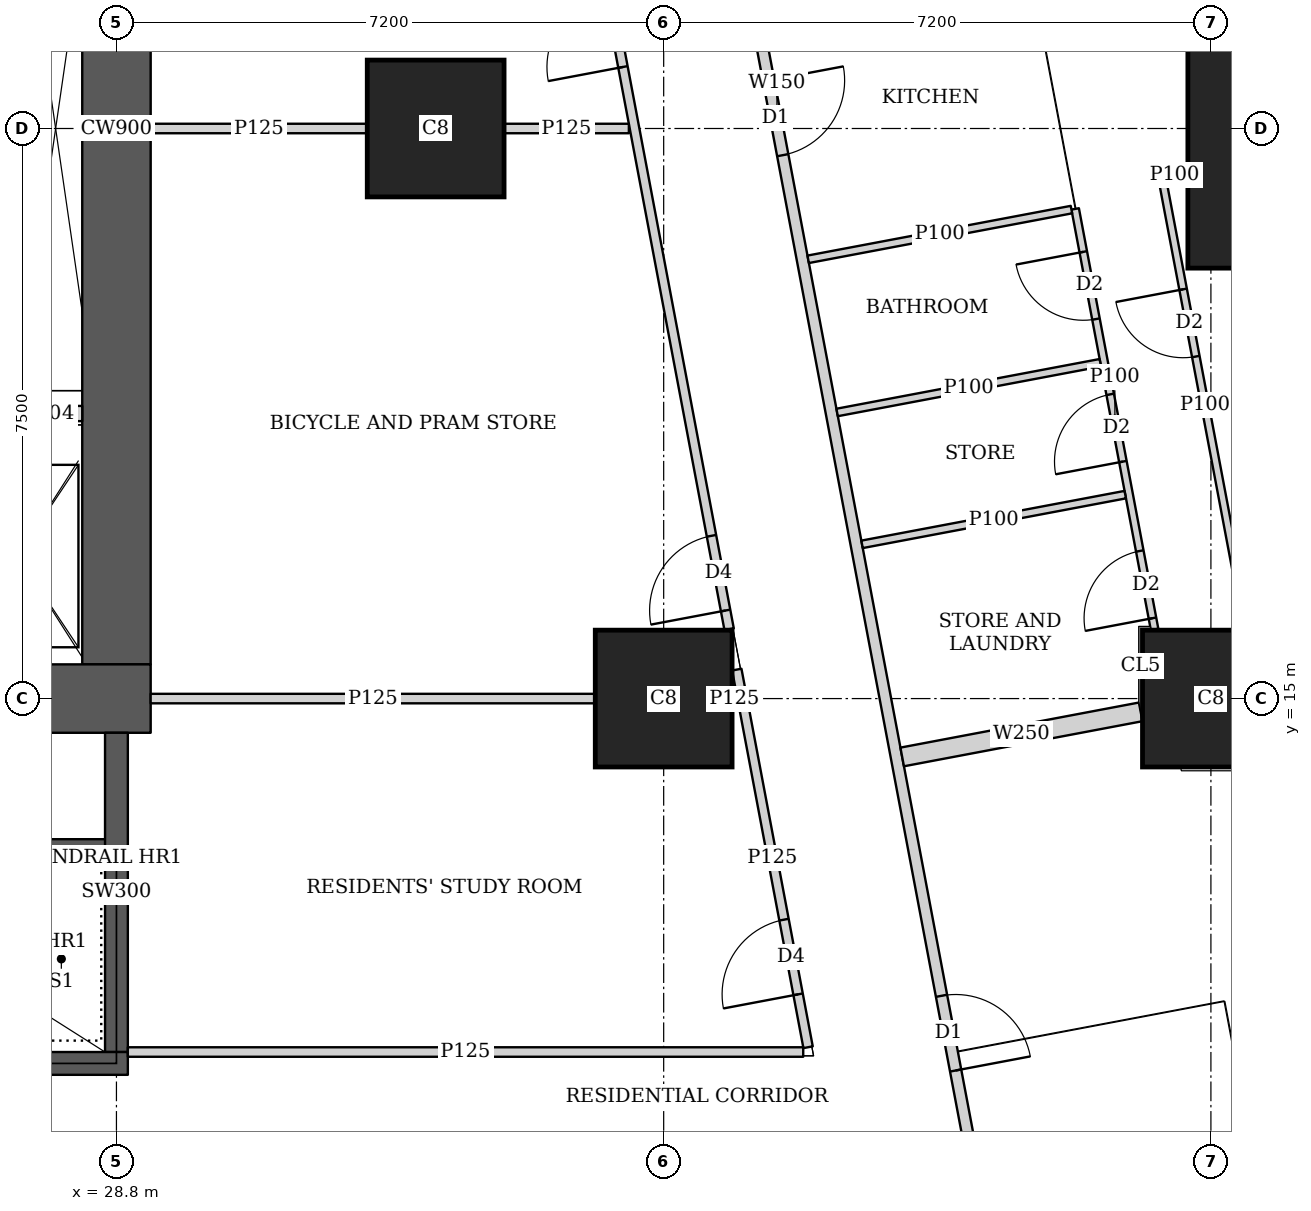
"""IFC4 building model, lengths in metres.
Left out: names, types, materials, properties, quantities, classifications, styles, units other than length and angle.
Written with IfcOpenShell. Run it as: python <this file> out.ifc"""

import sys

from ifc_helpers import new_model, si_unit, direction, frame, frame_2d, origin, origin_2d, place, context, subcontext, project, spatial, rectangle, extrude, element, fill, save


model = new_model("IFC4")
c1 = context("Model", 3, precision=1e-05, world=origin(), true_north=direction((0.0, 1.0)))
c2 = subcontext(c1, "Body", "Model", "MODEL_VIEW")
j1 = project(units=[si_unit("LENGTHUNIT", "METRE"), si_unit("PLANEANGLEUNIT", "RADIAN")], contexts=[c1])
p1 = place(None, origin())
s1 = spatial("IfcSite", under=j1, at=p1, CompositionType="ELEMENT")
p2 = place(p1, origin())
s2 = spatial("IfcBuilding", under=s1, at=p2, CompositionType="ELEMENT")
p3 = place(p2, frame((0.0, 0.0, 42.5)))
s3 = spatial("IfcBuildingStorey", under=s2, at=p3, CompositionType="ELEMENT", Elevation=42.5)
for number, where, z_axis, x_axis in (
    (1, (36.0, 15.0, 0.0), (0.0, 0.0, 1.0), (1.0, 0.0, 0.0)),
    (2, (43.2, 15.0, 0.0), (0.0, 0.0, 1.0), (1.0, 0.0, 0.0)),
    (3, (33.0, 22.5, 0.0), (0.0, 0.0, 1.0), (1.0, 0.0, 0.0)),
):
    element("IfcColumn", number, at=place(p3, frame(where, z_axis=z_axis, x_axis=x_axis)), inside=s3, PredefinedType="COLUMN", context=c2, shape_type="SweptSolid", body=[
        extrude(rectangle(XDim=1.8, YDim=1.8, at=origin_2d()), origin(), (0.0, 0.0, 1.0), 3.75),
    ])
p4 = place(p3, frame((44.697, 22.263, 0.0), z_axis=(0.0, 0.0, 1.0), x_axis=(1.0, 0.0, 0.0)))
e4 = element("IfcColumn", 4, at=p4, inside=s3, PredefinedType="COLUMN", context=c2, shape_type="SweptSolid", body=[
    extrude(rectangle(XDim=3.6, YDim=3.2, at=origin_2d()), origin(), (0.0, 0.0, 1.0), 3.75),
])
p5 = place(p3, frame((13.95, 15.0, 0.0), z_axis=(0.0, 0.0, 1.0), x_axis=(1.0, 0.0, 0.0)))
e5 = element("IfcWall", 5, at=p5, inside=s3, PredefinedType="SHEAR", context=c2, shape_type="SweptSolid", body=[
    extrude(rectangle(XDim=15.3, YDim=0.9, at=frame_2d((7.65, 0.0))), origin(), (0.0, 0.0, 1.0), 3.75),
])
p6 = place(p5, frame((4.45, 0.0, 0.0)))
e6 = element("IfcOpeningElement", 6, at=p6, cuts=e5, PredefinedType="OPENING", context=c2, shape_type="SweptSolid", body=[
    extrude(rectangle(XDim=1.8, YDim=2.1, at=frame_2d((0.9, 1.05))), frame((0.0, 0.46, 0.0), z_axis=(0.0, -1.0, 0.0), x_axis=(1.0, 0.0, 0.0)), (0.0, 0.0, 1.0), 0.92),
])
p7 = place(p5, frame((10.7, 0.0, 0.0)))
e7 = element("IfcOpeningElement", 7, at=p7, cuts=e5, PredefinedType="OPENING", context=c2, shape_type="SweptSolid", body=[
    extrude(rectangle(XDim=1.1, YDim=2.1, at=frame_2d((0.55, 1.05))), frame((0.0, 0.46, 0.0), z_axis=(0.0, -1.0, 0.0), x_axis=(1.0, 0.0, 0.0)), (0.0, 0.0, 1.0), 0.92),
])
p8 = place(p3, frame((28.8, 15.45, 0.0), z_axis=(0.0, 0.0, 1.0), x_axis=(0.0, 1.0, 0.0)))
e8 = element("IfcWall", 8, at=p8, inside=s3, PredefinedType="SHEAR", context=c2, shape_type="SweptSolid", body=[
    extrude(rectangle(XDim=14.1, YDim=0.9, at=frame_2d((7.05, 0.0))), origin(), (0.0, 0.0, 1.0), 3.75),
])
p9 = place(p3, frame((21.45, 10.2, 0.0), z_axis=(0.0, 0.0, 1.0), x_axis=(1.0, 0.0, 0.0)))
e9 = element("IfcWall", 9, at=p9, inside=s3, PredefinedType="SHEAR", context=c2, shape_type="SweptSolid", body=[
    extrude(rectangle(XDim=7.5, YDim=0.3, at=frame_2d((3.75, 0.0))), origin(), (0.0, 0.0, 1.0), 3.75),
])
p10 = place(p9, frame((0.5, 0.0, 0.0)))
e10 = element("IfcOpeningElement", 10, at=p10, cuts=e9, PredefinedType="OPENING", context=c2, shape_type="SweptSolid", body=[
    extrude(rectangle(XDim=1.1, YDim=2.1, at=frame_2d((0.55, 1.05))), frame((0.0, 0.16, 0.0), z_axis=(0.0, -1.0, 0.0), x_axis=(1.0, 0.0, 0.0)), (0.0, 0.0, 1.0), 0.32),
])
p11 = place(p3, frame((28.8, 10.35, 0.0), z_axis=(0.0, 0.0, 1.0), x_axis=(0.0, 1.0, 0.0)))
e11 = element("IfcWall", 11, at=p11, inside=s3, PredefinedType="SHEAR", context=c2, shape_type="SweptSolid", body=[
    extrude(rectangle(XDim=4.2, YDim=0.3, at=frame_2d((2.1, 0.0))), origin(), (0.0, 0.0, 1.0), 3.75),
])
p12 = place(p3, frame((50.653, 2.703, 0.0), z_axis=(0.0, 0.0, 1.0), x_axis=(-0.185612026696, 0.982623109613, 0.0)))
e12 = element("IfcWall", 12, at=p12, inside=s3, PredefinedType="SOLIDWALL", context=c2, shape_type="SweptSolid", body=[
    extrude(rectangle(XDim=41.393, YDim=0.2, at=frame_2d((20.697, 0.0))), origin(), (0.0, 0.0, 1.0), 3.5),
])
p13 = place(p12, frame((1.633, 0.0, 0.9)))
e13 = element("IfcOpeningElement", 13, at=p13, cuts=e12, PredefinedType="OPENING", context=c2, shape_type="SweptSolid", body=[
    extrude(rectangle(XDim=1.8, YDim=1.5, at=frame_2d((0.9, 0.75))), frame((0.0, 0.11, 0.0), z_axis=(0.0, -1.0, 0.0), x_axis=(1.0, 0.0, 0.0)), (0.0, 0.0, 1.0), 0.22),
])
p14 = place(p12, frame((6.032, 0.0, 0.9)))
e14 = element("IfcOpeningElement", 14, at=p14, cuts=e12, PredefinedType="OPENING", context=c2, shape_type="SweptSolid", body=[
    extrude(rectangle(XDim=1.8, YDim=1.5, at=frame_2d((0.9, 0.75))), frame((0.0, 0.11, 0.0), z_axis=(0.0, -1.0, 0.0), x_axis=(1.0, 0.0, 0.0)), (0.0, 0.0, 1.0), 0.22),
])
p15 = place(p12, frame((9.848, 0.0, 0.9)))
e15 = element("IfcOpeningElement", 15, at=p15, cuts=e12, PredefinedType="OPENING", context=c2, shape_type="SweptSolid", body=[
    extrude(rectangle(XDim=1.8, YDim=1.5, at=frame_2d((0.9, 0.75))), frame((0.0, 0.11, 0.0), z_axis=(0.0, -1.0, 0.0), x_axis=(1.0, 0.0, 0.0)), (0.0, 0.0, 1.0), 0.22),
])
p16 = place(p12, frame((17.481, 0.0, 0.9)))
e16 = element("IfcOpeningElement", 16, at=p16, cuts=e12, PredefinedType="OPENING", context=c2, shape_type="SweptSolid", body=[
    extrude(rectangle(XDim=1.8, YDim=1.5, at=frame_2d((0.9, 0.75))), frame((0.0, 0.11, 0.0), z_axis=(0.0, -1.0, 0.0), x_axis=(1.0, 0.0, 0.0)), (0.0, 0.0, 1.0), 0.22),
])
p17 = place(p12, frame((21.297, 0.0, 0.9)))
e17 = element("IfcOpeningElement", 17, at=p17, cuts=e12, PredefinedType="OPENING", context=c2, shape_type="SweptSolid", body=[
    extrude(rectangle(XDim=1.8, YDim=1.5, at=frame_2d((0.9, 0.75))), frame((0.0, 0.11, 0.0), z_axis=(0.0, -1.0, 0.0), x_axis=(1.0, 0.0, 0.0)), (0.0, 0.0, 1.0), 0.22),
])
p18 = place(p12, frame((25.113, 0.0, 0.9)))
e18 = element("IfcOpeningElement", 18, at=p18, cuts=e12, PredefinedType="OPENING", context=c2, shape_type="SweptSolid", body=[
    extrude(rectangle(XDim=1.8, YDim=1.5, at=frame_2d((0.9, 0.75))), frame((0.0, 0.11, 0.0), z_axis=(0.0, -1.0, 0.0), x_axis=(1.0, 0.0, 0.0)), (0.0, 0.0, 1.0), 0.22),
])
p19 = place(p12, frame((28.93, 0.0, 0.9)))
e19 = element("IfcOpeningElement", 19, at=p19, cuts=e12, PredefinedType="OPENING", context=c2, shape_type="SweptSolid", body=[
    extrude(rectangle(XDim=1.8, YDim=1.5, at=frame_2d((0.9, 0.75))), frame((0.0, 0.11, 0.0), z_axis=(0.0, -1.0, 0.0), x_axis=(1.0, 0.0, 0.0)), (0.0, 0.0, 1.0), 0.22),
])
p20 = place(p12, frame((32.746, 0.0, 0.9)))
e20 = element("IfcOpeningElement", 20, at=p20, cuts=e12, PredefinedType="OPENING", context=c2, shape_type="SweptSolid", body=[
    extrude(rectangle(XDim=1.8, YDim=1.5, at=frame_2d((0.9, 0.75))), frame((0.0, 0.11, 0.0), z_axis=(0.0, -1.0, 0.0), x_axis=(1.0, 0.0, 0.0)), (0.0, 0.0, 1.0), 0.22),
])
p21 = place(p12, frame((36.481, 0.0, 0.9)))
e21 = element("IfcOpeningElement", 21, at=p21, cuts=e12, PredefinedType="OPENING", context=c2, shape_type="SweptSolid", body=[
    extrude(rectangle(XDim=1.8, YDim=1.5, at=frame_2d((0.9, 0.75))), frame((0.0, 0.11, 0.0), z_axis=(0.0, -1.0, 0.0), x_axis=(1.0, 0.0, 0.0)), (0.0, 0.0, 1.0), 0.22),
])
p22 = place(p3, frame((33.68, 42.723, 0.0), z_axis=(0.0, 0.0, 1.0), x_axis=(0.185624129307, -0.98262082342, 0.0)))
e22 = element("IfcWall", 22, at=p22, inside=s3, PredefinedType="SOLIDWALL", context=c2, shape_type="SweptSolid", body=[
    extrude(rectangle(XDim=41.051, YDim=0.15, at=frame_2d((20.526, 0.0))), origin(), (0.0, 0.0, 1.0), 2.5),
])
p23 = place(p22, frame((7.73, 0.0, 0.0)))
e23 = element("IfcOpeningElement", 23, at=p23, cuts=e22, PredefinedType="OPENING", context=c2, shape_type="SweptSolid", body=[
    extrude(rectangle(XDim=1.0, YDim=2.1, at=frame_2d((0.5, 1.05))), frame((0.0, 0.085, 0.0), z_axis=(0.0, -1.0, 0.0), x_axis=(1.0, 0.0, 0.0)), (0.0, 0.0, 1.0), 0.17),
])
p24 = place(p22, frame((12.307, 0.0, 0.0)))
e24 = element("IfcOpeningElement", 24, at=p24, cuts=e22, PredefinedType="OPENING", context=c2, shape_type="SweptSolid", body=[
    extrude(rectangle(XDim=1.0, YDim=2.1, at=frame_2d((0.5, 1.05))), frame((0.0, 0.085, 0.0), z_axis=(0.0, -1.0, 0.0), x_axis=(1.0, 0.0, 0.0)), (0.0, 0.0, 1.0), 0.17),
])
p25 = place(p22, frame((19.938, 0.0, 0.0)))
e25 = element("IfcOpeningElement", 25, at=p25, cuts=e22, PredefinedType="OPENING", context=c2, shape_type="SweptSolid", body=[
    extrude(rectangle(XDim=1.0, YDim=2.1, at=frame_2d((0.5, 1.05))), frame((0.0, 0.085, 0.0), z_axis=(0.0, -1.0, 0.0), x_axis=(1.0, 0.0, 0.0)), (0.0, 0.0, 1.0), 0.17),
])
p26 = place(p22, frame((32.193, 0.0, 0.0)))
e26 = element("IfcOpeningElement", 26, at=p26, cuts=e22, PredefinedType="OPENING", context=c2, shape_type="SweptSolid", body=[
    extrude(rectangle(XDim=1.0, YDim=2.1, at=frame_2d((0.5, 1.05))), frame((0.0, 0.085, 0.0), z_axis=(0.0, -1.0, 0.0), x_axis=(1.0, 0.0, 0.0)), (0.0, 0.0, 1.0), 0.17),
])
p27 = place(p3, frame((42.565, 21.809, 0.0), z_axis=(0.0, 0.0, 1.0), x_axis=(0.185719768524, -0.982602751665, 0.0)))
e27 = element("IfcWall", 27, at=p27, inside=s3, PredefinedType="PARTITIONING", context=c2, shape_type="SweptSolid", body=[
    extrude(rectangle(XDim=6.004, YDim=0.1, at=frame_2d((3.002, 0.0))), origin(), (0.0, 0.0, 1.0), 2.5),
])
p28 = place(p27, frame((1.45, 0.0, 0.0)))
e28 = element("IfcOpeningElement", 28, at=p28, cuts=e27, PredefinedType="OPENING", context=c2, shape_type="SweptSolid", body=[
    extrude(rectangle(XDim=0.9, YDim=2.1, at=frame_2d((0.45, 1.05))), frame((0.0, 0.06, 0.0), z_axis=(0.0, -1.0, 0.0), x_axis=(1.0, 0.0, 0.0)), (0.0, 0.0, 1.0), 0.12),
])
p29 = place(p3, frame((41.414, 21.442, 0.0), z_axis=(0.0, 0.0, 1.0), x_axis=(0.185605379031, -0.982624365297, 0.0)))
e29 = element("IfcWall", 29, at=p29, inside=s3, PredefinedType="PARTITIONING", context=c2, shape_type="SweptSolid", body=[
    extrude(rectangle(XDim=5.63, YDim=0.1, at=frame_2d((2.815, 0.0))), origin(), (0.0, 0.0, 1.0), 3.5),
])
p30 = place(p29, frame((0.575, 0.0, 0.0)))
e30 = element("IfcOpeningElement", 30, at=p30, cuts=e29, PredefinedType="OPENING", context=c2, shape_type="SweptSolid", body=[
    extrude(rectangle(XDim=0.9, YDim=2.1, at=frame_2d((0.45, 1.05))), frame((0.0, 0.06, 0.0), z_axis=(0.0, -1.0, 0.0), x_axis=(1.0, 0.0, 0.0)), (0.0, 0.0, 1.0), 0.12),
])
p31 = place(p29, frame((4.58, 0.0, 0.0)))
e31 = element("IfcOpeningElement", 31, at=p31, cuts=e29, PredefinedType="OPENING", context=c2, shape_type="SweptSolid", body=[
    extrude(rectangle(XDim=0.9, YDim=2.1, at=frame_2d((0.45, 1.05))), frame((0.0, 0.06, 0.0), z_axis=(0.0, -1.0, 0.0), x_axis=(1.0, 0.0, 0.0)), (0.0, 0.0, 1.0), 0.12),
])
p32 = place(p29, frame((2.483, 0.0, 0.0)))
e32 = element("IfcOpeningElement", 32, at=p32, cuts=e29, PredefinedType="OPENING", context=c2, shape_type="SweptSolid", body=[
    extrude(rectangle(XDim=0.9, YDim=2.1, at=frame_2d((0.45, 1.05))), frame((0.0, 0.06, 0.0), z_axis=(0.0, -1.0, 0.0), x_axis=(1.0, 0.0, 0.0)), (0.0, 0.0, 1.0), 0.12),
])
p33 = place(p3, frame((42.887, 21.921, 0.0), z_axis=(0.0, 0.0, 1.0), x_axis=(-0.982274918032, -0.187445953293, 0.0)))
e33 = element("IfcWall", 33, at=p33, inside=s3, PredefinedType="PARTITIONING", context=c2, shape_type="SweptSolid", body=[
    extrude(rectangle(XDim=0.336, YDim=0.1, at=frame_2d((0.168, 0.0))), origin(), (0.0, 0.0, 1.0), 2.5),
])
p34 = place(p3, frame((41.365, 21.433, 0.0), z_axis=(0.0, 0.0, 1.0), x_axis=(-0.982638553676, -0.185530247748, 0.0)))
e34 = element("IfcWall", 34, at=p34, inside=s3, PredefinedType="PARTITIONING", context=c2, shape_type="SweptSolid", body=[
    extrude(rectangle(XDim=3.525, YDim=0.1, at=frame_2d((1.763, 0.0))), origin(), (0.0, 0.0, 1.0), 3.5),
])
p35 = place(p3, frame((42.073, 17.683, 0.0), z_axis=(0.0, 0.0, 1.0), x_axis=(-0.982626628545, -0.185593396635, 0.0)))
e35 = element("IfcWall", 35, at=p35, inside=s3, PredefinedType="PARTITIONING", context=c2, shape_type="SweptSolid", body=[
    extrude(rectangle(XDim=3.524, YDim=0.1, at=frame_2d((1.762, 0.0))), origin(), (0.0, 0.0, 1.0), 3.5),
])
p36 = place(p3, frame((41.745, 19.418, 0.0), z_axis=(0.0, 0.0, 1.0), x_axis=(-0.982629014545, -0.18558076348, 0.0)))
e36 = element("IfcWall", 36, at=p36, inside=s3, PredefinedType="PARTITIONING", context=c2, shape_type="SweptSolid", body=[
    extrude(rectangle(XDim=3.524, YDim=0.1, at=frame_2d((1.762, 0.0))), origin(), (0.0, 0.0, 1.0), 3.5),
])
p37 = place(p3, frame((42.276, 14.825, 0.0), z_axis=(0.0, 0.0, 1.0), x_axis=(-0.982607211054, -0.185696173318, 0.0)))
e37 = element("IfcWall", 37, at=p37, inside=s3, PredefinedType="SOLIDWALL", context=c2, shape_type="SweptSolid", body=[
    extrude(rectangle(XDim=3.194, YDim=0.25, at=frame_2d((1.597, 0.0))), origin(), (0.0, 0.0, 1.0), 3.5),
])
p38 = place(p3, frame((28.95, 10.35, 0.0), z_axis=(0.0, 0.0, 1.0), x_axis=(1.0, 0.0, 0.0)))
e38 = element("IfcWall", 38, at=p38, inside=s3, PredefinedType="PARTITIONING", context=c2, shape_type="SweptSolid", body=[
    extrude(rectangle(XDim=8.886, YDim=0.125, at=frame_2d((4.443, 0.0))), origin(), (0.0, 0.0, 1.0), 3.5),
])
p39 = place(p3, frame((37.9, 10.413, 0.0), z_axis=(0.0, 0.0, 1.0), x_axis=(-0.185527510388, 0.982639070508, 0.0)))
e39 = element("IfcWall", 39, at=p39, inside=s3, PredefinedType="PARTITIONING", context=c2, shape_type="SweptSolid", body=[
    extrude(rectangle(XDim=5.056, YDim=0.125, at=frame_2d((2.528, 0.0))), origin(), (0.0, 0.0, 1.0), 3.5),
])
p40 = place(p39, frame((0.708, 0.0, 0.0)))
e40 = element("IfcOpeningElement", 40, at=p40, cuts=e39, PredefinedType="OPENING", context=c2, shape_type="SweptSolid", body=[
    extrude(rectangle(XDim=1.0, YDim=2.1, at=frame_2d((0.5, 1.05))), frame((0.0, 0.073, 0.0), z_axis=(0.0, -1.0, 0.0), x_axis=(1.0, 0.0, 0.0)), (0.0, 0.0, 1.0), 0.145),
])
p41 = place(p3, frame((36.861, 15.913, 0.0), z_axis=(0.0, 0.0, 1.0), x_axis=(-0.185588307143, 0.982627589808, 0.0)))
e41 = element("IfcWall", 41, at=p41, inside=s3, PredefinedType="PARTITIONING", context=c2, shape_type="SweptSolid", body=[
    extrude(rectangle(XDim=19.005, YDim=0.125, at=frame_2d((9.502, 0.0))), origin(), (0.0, 0.0, 1.0), 2.5),
])
p42 = place(p41, frame((0.25, 0.0, 0.0)))
e42 = element("IfcOpeningElement", 42, at=p42, cuts=e41, PredefinedType="OPENING", context=c2, shape_type="SweptSolid", body=[
    extrude(rectangle(XDim=1.0, YDim=2.1, at=frame_2d((0.5, 1.05))), frame((0.0, 0.073, 0.0), z_axis=(0.0, -1.0, 0.0), x_axis=(1.0, 0.0, 0.0)), (0.0, 0.0, 1.0), 0.145),
])
p43 = place(p41, frame((7.527, 0.0, 0.0)))
e43 = element("IfcOpeningElement", 43, at=p43, cuts=e41, PredefinedType="OPENING", context=c2, shape_type="SweptSolid", body=[
    extrude(rectangle(XDim=1.0, YDim=2.1, at=frame_2d((0.5, 1.05))), frame((0.0, 0.073, 0.0), z_axis=(0.0, -1.0, 0.0), x_axis=(1.0, 0.0, 0.0)), (0.0, 0.0, 1.0), 0.145),
])
p44 = place(p41, frame((15.5, 0.0, 0.0)))
e44 = element("IfcOpeningElement", 44, at=p44, cuts=e41, PredefinedType="OPENING", context=c2, shape_type="SweptSolid", body=[
    extrude(rectangle(XDim=1.0, YDim=2.1, at=frame_2d((0.5, 1.05))), frame((0.0, 0.073, 0.0), z_axis=(0.0, -1.0, 0.0), x_axis=(1.0, 0.0, 0.0)), (0.0, 0.0, 1.0), 0.145),
])
p45 = place(p3, frame((29.25, 15.0, 0.0), z_axis=(0.0, 0.0, 1.0), x_axis=(1.0, 0.0, 0.0)))
e45 = element("IfcWall", 45, at=p45, inside=s3, PredefinedType="PARTITIONING", context=c2, shape_type="SweptSolid", body=[
    extrude(rectangle(XDim=5.849, YDim=0.125, at=frame_2d((2.925, 0.0))), origin(), (0.0, 0.0, 1.0), 3.5),
])
p46 = place(p3, frame((36.901, 15.0, 0.0), z_axis=(0.0, 0.0, 1.0), x_axis=(1.0, 0.0, 0.0)))
e46 = element("IfcWall", 46, at=p46, inside=s3, PredefinedType="PARTITIONING", context=c2, shape_type="SweptSolid", body=[
    extrude(rectangle(XDim=0.057, YDim=0.125, at=frame_2d((0.029, 0.0))), origin(), (0.0, 0.0, 1.0), 3.5),
])
p47 = place(p3, frame((29.25, 22.5, 0.0), z_axis=(0.0, 0.0, 1.0), x_axis=(1.0, 0.0, 0.0)))
e47 = element("IfcWall", 47, at=p47, inside=s3, PredefinedType="PARTITIONING", context=c2, shape_type="SweptSolid", body=[
    extrude(rectangle(XDim=2.849, YDim=0.125, at=frame_2d((1.425, 0.0))), origin(), (0.0, 0.0, 1.0), 3.5),
])
p48 = place(p3, frame((33.901, 22.5, 0.0), z_axis=(0.0, 0.0, 1.0), x_axis=(1.0, 0.0, 0.0)))
e48 = element("IfcWall", 48, at=p48, inside=s3, PredefinedType="PARTITIONING", context=c2, shape_type="SweptSolid", body=[
    extrude(rectangle(XDim=1.641, YDim=0.125, at=frame_2d((0.821, 0.0))), origin(), (0.0, 0.0, 1.0), 2.5),
])
p49 = place(p3, frame((23.0, 13.05, 0.0), z_axis=(0.0, 0.0, 1.0), x_axis=(1.0, 0.0, 0.0)))
e49 = element("IfcWall", 49, at=p49, inside=s3, PredefinedType="SHEAR", context=c2, shape_type="SweptSolid", body=[
    extrude(rectangle(XDim=5.8, YDim=0.2, at=frame_2d((2.9, 0.0))), origin(), (0.0, 0.0, 1.0), 3.75),
])
p50 = place(p3, frame((27.4, 18.75, 0.0), z_axis=(0.0, 0.0, 1.0), x_axis=(1.0, 0.0, 0.0)))
e50 = element("IfcWall", 50, at=p50, inside=s3, PredefinedType="SOLIDWALL", context=c2, shape_type="SweptSolid", body=[
    extrude(rectangle(XDim=0.95, YDim=0.2, at=frame_2d((0.475, 0.0))), origin(), (0.0, 0.0, 1.0), 3.5),
])
p51 = place(p28, origin())
e51 = element("IfcDoor", 51, at=p51, inside=s3, OperationType="SINGLE_SWING_RIGHT", PredefinedType="DOOR", context=c2, shape_type="SweptSolid", body=[
    extrude(rectangle(XDim=0.9, YDim=2.1, at=frame_2d((0.45, 1.05))), frame((0.0, 0.025, 0.0), z_axis=(0.0, -1.0, 0.0), x_axis=(1.0, 0.0, 0.0)), (0.0, 0.0, 1.0), 0.05),
])
fill(e28, e51)
p52 = place(p30, origin())
e52 = element("IfcDoor", 52, at=p52, inside=s3, OperationType="SINGLE_SWING_RIGHT", PredefinedType="DOOR", context=c2, shape_type="SweptSolid", body=[
    extrude(rectangle(XDim=0.9, YDim=2.1, at=frame_2d((0.45, 1.05))), frame((0.0, 0.025, 0.0), z_axis=(0.0, -1.0, 0.0), x_axis=(1.0, 0.0, 0.0)), (0.0, 0.0, 1.0), 0.05),
])
fill(e30, e52)
p53 = place(p31, origin())
e53 = element("IfcDoor", 53, at=p53, inside=s3, OperationType="SINGLE_SWING_LEFT", PredefinedType="DOOR", context=c2, shape_type="SweptSolid", body=[
    extrude(rectangle(XDim=0.9, YDim=2.1, at=frame_2d((0.45, 1.05))), frame((0.0, 0.025, 0.0), z_axis=(0.0, -1.0, 0.0), x_axis=(1.0, 0.0, 0.0)), (0.0, 0.0, 1.0), 0.05),
])
fill(e31, e53)
p54 = place(p32, origin())
e54 = element("IfcDoor", 54, at=p54, inside=s3, OperationType="SINGLE_SWING_LEFT", PredefinedType="DOOR", context=c2, shape_type="SweptSolid", body=[
    extrude(rectangle(XDim=0.9, YDim=2.1, at=frame_2d((0.45, 1.05))), frame((0.0, 0.025, 0.0), z_axis=(0.0, -1.0, 0.0), x_axis=(1.0, 0.0, 0.0)), (0.0, 0.0, 1.0), 0.05),
])
fill(e32, e54)
p55 = place(p25, origin())
e55 = element("IfcDoor", 55, at=p55, inside=s3, OperationType="SINGLE_SWING_LEFT", PredefinedType="DOOR", context=c2, shape_type="SweptSolid", body=[
    extrude(rectangle(XDim=1.0, YDim=2.1, at=frame_2d((0.5, 1.05))), frame((0.0, 0.025, 0.0), z_axis=(0.0, -1.0, 0.0), x_axis=(1.0, 0.0, 0.0)), (0.0, 0.0, 1.0), 0.05),
])
fill(e25, e55)
p56 = place(p26, origin())
e56 = element("IfcDoor", 56, at=p56, inside=s3, OperationType="SINGLE_SWING_RIGHT", PredefinedType="DOOR", context=c2, shape_type="SweptSolid", body=[
    extrude(rectangle(XDim=1.0, YDim=2.1, at=frame_2d((0.5, 1.05))), frame((0.0, 0.025, 0.0), z_axis=(0.0, -1.0, 0.0), x_axis=(1.0, 0.0, 0.0)), (0.0, 0.0, 1.0), 0.05),
])
fill(e26, e56)
p57 = place(p40, origin())
e57 = element("IfcDoor", 57, at=p57, inside=s3, OperationType="SINGLE_SWING_LEFT", PredefinedType="DOOR", context=c2, shape_type="SweptSolid", body=[
    extrude(rectangle(XDim=1.0, YDim=2.1, at=frame_2d((0.5, 1.05))), frame((0.0, 0.025, 0.0), z_axis=(0.0, -1.0, 0.0), x_axis=(1.0, 0.0, 0.0)), (0.0, 0.0, 1.0), 0.05),
])
fill(e40, e57)
p58 = place(p42, origin())
e58 = element("IfcDoor", 58, at=p58, inside=s3, OperationType="SINGLE_SWING_LEFT", PredefinedType="DOOR", context=c2, shape_type="SweptSolid", body=[
    extrude(rectangle(XDim=1.0, YDim=2.1, at=frame_2d((0.5, 1.05))), frame((0.0, 0.025, 0.0), z_axis=(0.0, -1.0, 0.0), x_axis=(1.0, 0.0, 0.0)), (0.0, 0.0, 1.0), 0.05),
])
fill(e42, e58)
p59 = place(p43, origin())
e59 = element("IfcDoor", 59, at=p59, inside=s3, OperationType="SINGLE_SWING_LEFT", PredefinedType="DOOR", context=c2, shape_type="SweptSolid", body=[
    extrude(rectangle(XDim=1.0, YDim=2.1, at=frame_2d((0.5, 1.05))), frame((0.0, 0.025, 0.0), z_axis=(0.0, -1.0, 0.0), x_axis=(1.0, 0.0, 0.0)), (0.0, 0.0, 1.0), 0.05),
])
fill(e43, e59)
save(model, sys.argv[1])
